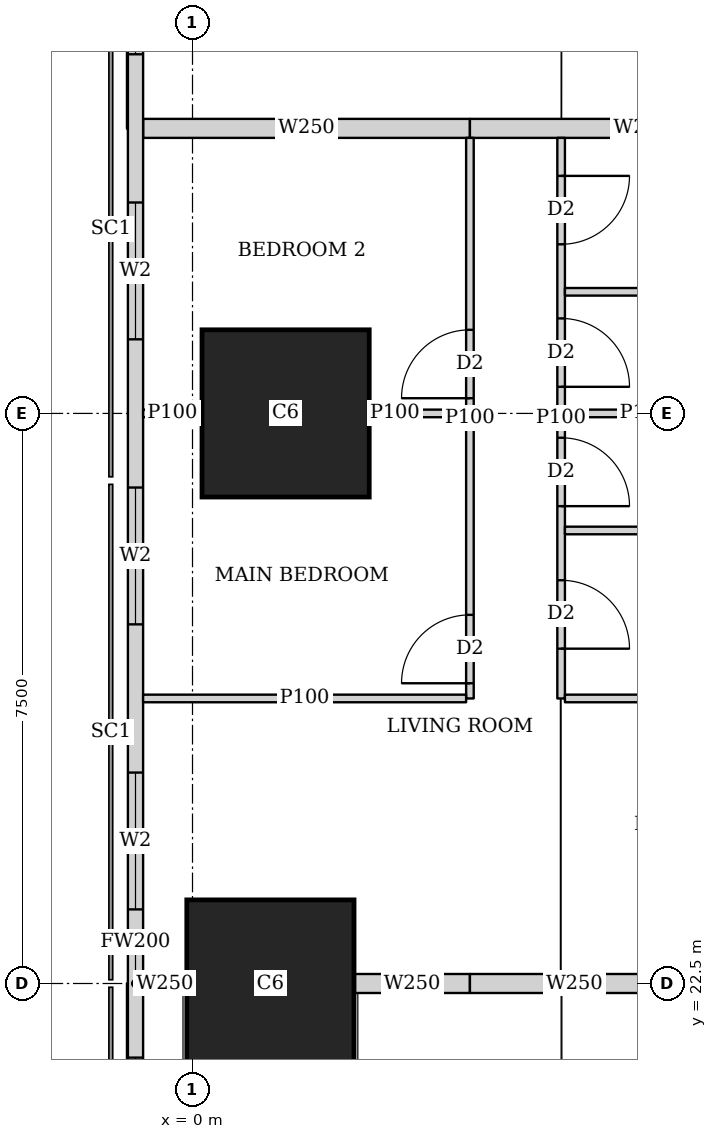
"""IFC4 building model, lengths in metres.
Left out: names, types, materials, properties, quantities, classifications, styles, units other than length and angle.
Written with IfcOpenShell. Run it as: python <this file> out.ifc"""

import sys

from ifc_helpers import new_model, si_unit, direction, frame, frame_2d, origin, origin_2d, place, context, subcontext, project, spatial, rectangle, extrude, element, fill, save


model = new_model("IFC4")
c1 = context("Model", 3, precision=1e-05, world=origin(), true_north=direction((0.0, 1.0)))
c2 = subcontext(c1, "Body", "Model", "MODEL_VIEW")
j1 = project(units=[si_unit("LENGTHUNIT", "METRE"), si_unit("PLANEANGLEUNIT", "RADIAN")], contexts=[c1])
p1 = place(None, origin())
s1 = spatial("IfcSite", under=j1, at=p1, CompositionType="ELEMENT")
p2 = place(p1, origin())
s2 = spatial("IfcBuilding", under=s1, at=p2, CompositionType="ELEMENT")
p3 = place(p2, frame((0.0, 0.0, 77.9)))
s3 = spatial("IfcBuildingStorey", under=s2, at=p3, CompositionType="ELEMENT", Elevation=77.9)
for number, where, z_axis, x_axis in (
    (1, (1.025, 22.5, 0.0), (0.0, 0.0, 1.0), (1.0, 0.0, 0.0)),
    (2, (1.225, 30.0, 0.0), (0.0, 0.0, 1.0), (1.0, 0.0, 0.0)),
):
    element("IfcColumn", number, at=place(p3, frame(where, z_axis=z_axis, x_axis=x_axis)), inside=s3, PredefinedType="COLUMN", context=c2, shape_type="SweptSolid", body=[
        extrude(rectangle(XDim=2.2, YDim=2.2, at=origin_2d()), origin(), (0.0, 0.0, 1.0), 3.75),
    ])
p4 = place(p3, frame((-0.75, 42.837, 0.0), z_axis=(0.0, 0.0, 1.0), x_axis=(0.0, -1.0, 0.0)))
e3 = element("IfcWall", 3, at=p4, inside=s3, PredefinedType="SOLIDWALL", context=c2, shape_type="SweptSolid", body=[
    extrude(rectangle(XDim=40.674, YDim=0.2, at=frame_2d((20.337, 0.0))), origin(), (0.0, 0.0, 1.0), 3.5),
])
p5 = place(p4, frame((1.78, 0.0, 0.9)))
e4 = element("IfcOpeningElement", 4, at=p5, cuts=e3, PredefinedType="OPENING", context=c2, shape_type="SweptSolid", body=[
    extrude(rectangle(XDim=1.8, YDim=1.5, at=frame_2d((0.9, 0.75))), frame((0.0, 0.11, 0.0), z_axis=(0.0, -1.0, 0.0), x_axis=(1.0, 0.0, 0.0)), (0.0, 0.0, 1.0), 0.22),
])
p6 = place(p4, frame((6.312, 0.0, 0.9)))
e5 = element("IfcOpeningElement", 5, at=p6, cuts=e3, PredefinedType="OPENING", context=c2, shape_type="SweptSolid", body=[
    extrude(rectangle(XDim=1.8, YDim=1.5, at=frame_2d((0.9, 0.75))), frame((0.0, 0.11, 0.0), z_axis=(0.0, -1.0, 0.0), x_axis=(1.0, 0.0, 0.0)), (0.0, 0.0, 1.0), 0.22),
])
p7 = place(p4, frame((10.062, 0.0, 0.9)))
e6 = element("IfcOpeningElement", 6, at=p7, cuts=e3, PredefinedType="OPENING", context=c2, shape_type="SweptSolid", body=[
    extrude(rectangle(XDim=1.8, YDim=1.5, at=frame_2d((0.9, 0.75))), frame((0.0, 0.11, 0.0), z_axis=(0.0, -1.0, 0.0), x_axis=(1.0, 0.0, 0.0)), (0.0, 0.0, 1.0), 0.22),
])
p8 = place(p4, frame((13.812, 0.0, 0.9)))
e7 = element("IfcOpeningElement", 7, at=p8, cuts=e3, PredefinedType="OPENING", context=c2, shape_type="SweptSolid", body=[
    extrude(rectangle(XDim=1.8, YDim=1.5, at=frame_2d((0.9, 0.75))), frame((0.0, 0.11, 0.0), z_axis=(0.0, -1.0, 0.0), x_axis=(1.0, 0.0, 0.0)), (0.0, 0.0, 1.0), 0.22),
])
p9 = place(p4, frame((17.562, 0.0, 0.9)))
e8 = element("IfcOpeningElement", 8, at=p9, cuts=e3, PredefinedType="OPENING", context=c2, shape_type="SweptSolid", body=[
    extrude(rectangle(XDim=1.8, YDim=1.5, at=frame_2d((0.9, 0.75))), frame((0.0, 0.11, 0.0), z_axis=(0.0, -1.0, 0.0), x_axis=(1.0, 0.0, 0.0)), (0.0, 0.0, 1.0), 0.22),
])
p10 = place(p4, frame((21.312, 0.0, 0.9)))
e9 = element("IfcOpeningElement", 9, at=p10, cuts=e3, PredefinedType="OPENING", context=c2, shape_type="SweptSolid", body=[
    extrude(rectangle(XDim=1.8, YDim=1.5, at=frame_2d((0.9, 0.75))), frame((0.0, 0.11, 0.0), z_axis=(0.0, -1.0, 0.0), x_axis=(1.0, 0.0, 0.0)), (0.0, 0.0, 1.0), 0.22),
])
p11 = place(p4, frame((25.062, 0.0, 0.9)))
e10 = element("IfcOpeningElement", 10, at=p11, cuts=e3, PredefinedType="OPENING", context=c2, shape_type="SweptSolid", body=[
    extrude(rectangle(XDim=1.8, YDim=1.5, at=frame_2d((0.9, 0.75))), frame((0.0, 0.11, 0.0), z_axis=(0.0, -1.0, 0.0), x_axis=(1.0, 0.0, 0.0)), (0.0, 0.0, 1.0), 0.22),
])
p12 = place(p4, frame((28.812, 0.0, 0.9)))
e11 = element("IfcOpeningElement", 11, at=p12, cuts=e3, PredefinedType="OPENING", context=c2, shape_type="SweptSolid", body=[
    extrude(rectangle(XDim=1.8, YDim=1.5, at=frame_2d((0.9, 0.75))), frame((0.0, 0.11, 0.0), z_axis=(0.0, -1.0, 0.0), x_axis=(1.0, 0.0, 0.0)), (0.0, 0.0, 1.0), 0.22),
])
p13 = place(p4, frame((32.562, 0.0, 0.9)))
e12 = element("IfcOpeningElement", 12, at=p13, cuts=e3, PredefinedType="OPENING", context=c2, shape_type="SweptSolid", body=[
    extrude(rectangle(XDim=1.8, YDim=1.5, at=frame_2d((0.9, 0.75))), frame((0.0, 0.11, 0.0), z_axis=(0.0, -1.0, 0.0), x_axis=(1.0, 0.0, 0.0)), (0.0, 0.0, 1.0), 0.22),
])
p14 = place(p4, frame((37.094, 0.0, 0.9)))
e13 = element("IfcOpeningElement", 13, at=p14, cuts=e3, PredefinedType="OPENING", context=c2, shape_type="SweptSolid", body=[
    extrude(rectangle(XDim=1.8, YDim=1.5, at=frame_2d((0.9, 0.75))), frame((0.0, 0.11, 0.0), z_axis=(0.0, -1.0, 0.0), x_axis=(1.0, 0.0, 0.0)), (0.0, 0.0, 1.0), 0.22),
])
p15 = place(p3, frame((3.65, 26.25, 0.0), z_axis=(0.0, 0.0, 1.0), x_axis=(0.0, 1.0, 0.0)))
e14 = element("IfcWall", 14, at=p15, inside=s3, PredefinedType="PARTITIONING", context=c2, shape_type="SweptSolid", body=[
    extrude(rectangle(XDim=7.375, YDim=0.1, at=frame_2d((3.688, 0.0))), origin(), (0.0, 0.0, 1.0), 3.5),
])
p16 = place(p15, frame((0.2, 0.0, 0.0)))
e15 = element("IfcOpeningElement", 15, at=p16, cuts=e14, PredefinedType="OPENING", context=c2, shape_type="SweptSolid", body=[
    extrude(rectangle(XDim=0.9, YDim=2.1, at=frame_2d((0.45, 1.05))), frame((0.0, 0.06, 0.0), z_axis=(0.0, -1.0, 0.0), x_axis=(1.0, 0.0, 0.0)), (0.0, 0.0, 1.0), 0.12),
])
p17 = place(p15, frame((3.95, 0.0, 0.0)))
e16 = element("IfcOpeningElement", 16, at=p17, cuts=e14, PredefinedType="OPENING", context=c2, shape_type="SweptSolid", body=[
    extrude(rectangle(XDim=0.9, YDim=2.1, at=frame_2d((0.45, 1.05))), frame((0.0, 0.06, 0.0), z_axis=(0.0, -1.0, 0.0), x_axis=(1.0, 0.0, 0.0)), (0.0, 0.0, 1.0), 0.12),
])
p18 = place(p3, frame((4.85, 26.25, 0.0), z_axis=(0.0, 0.0, 1.0), x_axis=(0.0, 1.0, 0.0)))
e17 = element("IfcWall", 17, at=p18, inside=s3, PredefinedType="PARTITIONING", context=c2, shape_type="SweptSolid", body=[
    extrude(rectangle(XDim=7.375, YDim=0.1, at=frame_2d((3.688, 0.0))), origin(), (0.0, 0.0, 1.0), 3.5),
])
p19 = place(p18, frame((0.655, 0.0, 0.0)))
e18 = element("IfcOpeningElement", 18, at=p19, cuts=e17, PredefinedType="OPENING", context=c2, shape_type="SweptSolid", body=[
    extrude(rectangle(XDim=0.9, YDim=2.1, at=frame_2d((0.45, 1.05))), frame((0.0, 0.06, 0.0), z_axis=(0.0, -1.0, 0.0), x_axis=(1.0, 0.0, 0.0)), (0.0, 0.0, 1.0), 0.12),
])
p20 = place(p18, frame((4.1, 0.0, 0.0)))
e19 = element("IfcOpeningElement", 19, at=p20, cuts=e17, PredefinedType="OPENING", context=c2, shape_type="SweptSolid", body=[
    extrude(rectangle(XDim=0.9, YDim=2.1, at=frame_2d((0.45, 1.05))), frame((0.0, 0.06, 0.0), z_axis=(0.0, -1.0, 0.0), x_axis=(1.0, 0.0, 0.0)), (0.0, 0.0, 1.0), 0.12),
])
p21 = place(p18, frame((2.53, 0.0, 0.0)))
e20 = element("IfcOpeningElement", 20, at=p21, cuts=e17, PredefinedType="OPENING", context=c2, shape_type="SweptSolid", body=[
    extrude(rectangle(XDim=0.9, YDim=2.1, at=frame_2d((0.45, 1.05))), frame((0.0, 0.06, 0.0), z_axis=(0.0, -1.0, 0.0), x_axis=(1.0, 0.0, 0.0)), (0.0, 0.0, 1.0), 0.12),
])
p22 = place(p18, frame((5.975, 0.0, 0.0)))
e21 = element("IfcOpeningElement", 21, at=p22, cuts=e17, PredefinedType="OPENING", context=c2, shape_type="SweptSolid", body=[
    extrude(rectangle(XDim=0.9, YDim=2.1, at=frame_2d((0.45, 1.05))), frame((0.0, 0.06, 0.0), z_axis=(0.0, -1.0, 0.0), x_axis=(1.0, 0.0, 0.0)), (0.0, 0.0, 1.0), 0.12),
])
p23 = place(p3, frame((-0.65, 26.25, 0.0), z_axis=(0.0, 0.0, 1.0), x_axis=(1.0, 0.0, 0.0)))
e22 = element("IfcWall", 22, at=p23, inside=s3, PredefinedType="PARTITIONING", context=c2, shape_type="SweptSolid", body=[
    extrude(rectangle(XDim=4.25, YDim=0.1, at=frame_2d((2.125, 0.0))), origin(), (0.0, 0.0, 1.0), 2.2),
])
p24 = place(p3, frame((-0.65, 30.0, 0.0), z_axis=(0.0, 0.0, 1.0), x_axis=(1.0, 0.0, 0.0)))
e23 = element("IfcWall", 23, at=p24, inside=s3, PredefinedType="PARTITIONING", context=c2, shape_type="SweptSolid", body=[
    extrude(rectangle(XDim=0.774, YDim=0.1, at=frame_2d((0.387, 0.0))), origin(), (0.0, 0.0, 1.0), 3.5),
])
p25 = place(p3, frame((2.326, 30.0, 0.0), z_axis=(0.0, 0.0, 1.0), x_axis=(1.0, 0.0, 0.0)))
e24 = element("IfcWall", 24, at=p25, inside=s3, PredefinedType="PARTITIONING", context=c2, shape_type="SweptSolid", body=[
    extrude(rectangle(XDim=1.274, YDim=0.1, at=frame_2d((0.637, 0.0))), origin(), (0.0, 0.0, 1.0), 3.5),
])
p26 = place(p3, frame((4.9, 26.25, 0.0), z_axis=(0.0, 0.0, 1.0), x_axis=(1.0, 0.0, 0.0)))
e25 = element("IfcWall", 25, at=p26, inside=s3, PredefinedType="PARTITIONING", context=c2, shape_type="SweptSolid", body=[
    extrude(rectangle(XDim=3.275, YDim=0.1, at=frame_2d((1.638, 0.0))), origin(), (0.0, 0.0, 1.0), 3.5),
])
p27 = place(p3, frame((4.9, 30.0, 0.0), z_axis=(0.0, 0.0, 1.0), x_axis=(1.0, 0.0, 0.0)))
e26 = element("IfcWall", 26, at=p27, inside=s3, PredefinedType="PARTITIONING", context=c2, shape_type="SweptSolid", body=[
    extrude(rectangle(XDim=1.499, YDim=0.1, at=frame_2d((0.75, 0.0))), origin(), (0.0, 0.0, 1.0), 3.5),
])
for number, where, z_axis, x_axis in (
    (27, (4.9, 28.46, 0.0), (0.0, 0.0, 1.0), (1.0, 0.0, 0.0)),
    (28, (4.9, 31.6, 0.0), (0.0, 0.0, 1.0), (1.0, 0.0, 0.0)),
):
    element("IfcWall", number, at=place(p3, frame(where, z_axis=z_axis, x_axis=x_axis)), inside=s3, PredefinedType="PARTITIONING", context=c2, shape_type="SweptSolid", body=[
        extrude(rectangle(XDim=3.275, YDim=0.1, at=frame_2d((1.638, 0.0))), origin(), (0.0, 0.0, 1.0), 3.5),
    ])
p28 = place(p3, frame((-0.65, 22.5, 0.0), z_axis=(0.0, 0.0, 1.0), x_axis=(1.0, 0.0, 0.0)))
e29 = element("IfcWall", 29, at=p28, inside=s3, PredefinedType="SOLIDWALL", context=c2, shape_type="SweptSolid", body=[
    extrude(rectangle(XDim=0.574, YDim=0.25, at=frame_2d((0.287, 0.0))), origin(), (0.0, 0.0, 1.0), 3.5),
])
p29 = place(p3, frame((2.126, 22.5, 0.0), z_axis=(0.0, 0.0, 1.0), x_axis=(1.0, 0.0, 0.0)))
e30 = element("IfcWall", 30, at=p29, inside=s3, PredefinedType="SOLIDWALL", context=c2, shape_type="SweptSolid", body=[
    extrude(rectangle(XDim=1.524, YDim=0.25, at=frame_2d((0.762, 0.0))), origin(), (0.0, 0.0, 1.0), 3.5),
])
p30 = place(p3, frame((3.65, 22.5, 0.0), z_axis=(0.0, 0.0, 1.0), x_axis=(1.0, 0.0, 0.0)))
e31 = element("IfcWall", 31, at=p30, inside=s3, PredefinedType="SOLIDWALL", context=c2, shape_type="SweptSolid", body=[
    extrude(rectangle(XDim=2.749, YDim=0.25, at=frame_2d((1.375, 0.0))), origin(), (0.0, 0.0, 1.0), 3.5),
])
p31 = place(p3, frame((-0.65, 33.75, 0.0), z_axis=(0.0, 0.0, 1.0), x_axis=(1.0, 0.0, 0.0)))
e32 = element("IfcWall", 32, at=p31, inside=s3, PredefinedType="SOLIDWALL", context=c2, shape_type="SweptSolid", body=[
    extrude(rectangle(XDim=4.3, YDim=0.25, at=frame_2d((2.15, 0.0))), origin(), (0.0, 0.0, 1.0), 2.2),
])
p32 = place(p3, frame((3.65, 33.75, 0.0), z_axis=(0.0, 0.0, 1.0), x_axis=(1.0, 0.0, 0.0)))
e33 = element("IfcWall", 33, at=p32, inside=s3, PredefinedType="SOLIDWALL", context=c2, shape_type="SweptSolid", body=[
    extrude(rectangle(XDim=4.525, YDim=0.25, at=frame_2d((2.263, 0.0))), origin(), (0.0, 0.0, 1.0), 3.5),
])
p33 = place(p6, origin())
e34 = element("IfcWindow", 34, at=p33, inside=s3, PartitioningType="SINGLE_PANEL", PredefinedType="WINDOW", context=c2, shape_type="SweptSolid", body=[
    extrude(rectangle(XDim=1.8, YDim=1.5, at=frame_2d((0.9, 0.75))), frame((0.0, 0.03, 0.0), z_axis=(0.0, -1.0, 0.0), x_axis=(1.0, 0.0, 0.0)), (0.0, 0.0, 1.0), 0.06),
])
fill(e5, e34)
p34 = place(p7, origin())
e35 = element("IfcWindow", 35, at=p34, inside=s3, PartitioningType="SINGLE_PANEL", PredefinedType="WINDOW", context=c2, shape_type="SweptSolid", body=[
    extrude(rectangle(XDim=1.8, YDim=1.5, at=frame_2d((0.9, 0.75))), frame((0.0, 0.03, 0.0), z_axis=(0.0, -1.0, 0.0), x_axis=(1.0, 0.0, 0.0)), (0.0, 0.0, 1.0), 0.06),
])
fill(e6, e35)
p35 = place(p8, origin())
e36 = element("IfcWindow", 36, at=p35, inside=s3, PartitioningType="SINGLE_PANEL", PredefinedType="WINDOW", context=c2, shape_type="SweptSolid", body=[
    extrude(rectangle(XDim=1.8, YDim=1.5, at=frame_2d((0.9, 0.75))), frame((0.0, 0.03, 0.0), z_axis=(0.0, -1.0, 0.0), x_axis=(1.0, 0.0, 0.0)), (0.0, 0.0, 1.0), 0.06),
])
fill(e7, e36)
p36 = place(p9, origin())
e37 = element("IfcWindow", 37, at=p36, inside=s3, PartitioningType="SINGLE_PANEL", PredefinedType="WINDOW", context=c2, shape_type="SweptSolid", body=[
    extrude(rectangle(XDim=1.8, YDim=1.5, at=frame_2d((0.9, 0.75))), frame((0.0, 0.03, 0.0), z_axis=(0.0, -1.0, 0.0), x_axis=(1.0, 0.0, 0.0)), (0.0, 0.0, 1.0), 0.06),
])
fill(e8, e37)
p37 = place(p10, origin())
e38 = element("IfcWindow", 38, at=p37, inside=s3, PartitioningType="SINGLE_PANEL", PredefinedType="WINDOW", context=c2, shape_type="SweptSolid", body=[
    extrude(rectangle(XDim=1.8, YDim=1.5, at=frame_2d((0.9, 0.75))), frame((0.0, 0.03, 0.0), z_axis=(0.0, -1.0, 0.0), x_axis=(1.0, 0.0, 0.0)), (0.0, 0.0, 1.0), 0.06),
])
fill(e9, e38)
p38 = place(p16, origin())
e39 = element("IfcDoor", 39, at=p38, inside=s3, OperationType="SINGLE_SWING_LEFT", PredefinedType="DOOR", context=c2, shape_type="SweptSolid", body=[
    extrude(rectangle(XDim=0.9, YDim=2.1, at=frame_2d((0.45, 1.05))), frame((0.0, 0.025, 0.0), z_axis=(0.0, -1.0, 0.0), x_axis=(1.0, 0.0, 0.0)), (0.0, 0.0, 1.0), 0.05),
])
fill(e15, e39)
p39 = place(p17, origin())
e40 = element("IfcDoor", 40, at=p39, inside=s3, OperationType="SINGLE_SWING_LEFT", PredefinedType="DOOR", context=c2, shape_type="SweptSolid", body=[
    extrude(rectangle(XDim=0.9, YDim=2.1, at=frame_2d((0.45, 1.05))), frame((0.0, 0.025, 0.0), z_axis=(0.0, -1.0, 0.0), x_axis=(1.0, 0.0, 0.0)), (0.0, 0.0, 1.0), 0.05),
])
fill(e16, e40)
p40 = place(p19, origin())
e41 = element("IfcDoor", 41, at=p40, inside=s3, OperationType="SINGLE_SWING_RIGHT", PredefinedType="DOOR", context=c2, shape_type="SweptSolid", body=[
    extrude(rectangle(XDim=0.9, YDim=2.1, at=frame_2d((0.45, 1.05))), frame((0.0, 0.025, 0.0), z_axis=(0.0, -1.0, 0.0), x_axis=(1.0, 0.0, 0.0)), (0.0, 0.0, 1.0), 0.05),
])
fill(e18, e41)
p41 = place(p20, origin())
e42 = element("IfcDoor", 42, at=p41, inside=s3, OperationType="SINGLE_SWING_RIGHT", PredefinedType="DOOR", context=c2, shape_type="SweptSolid", body=[
    extrude(rectangle(XDim=0.9, YDim=2.1, at=frame_2d((0.45, 1.05))), frame((0.0, 0.025, 0.0), z_axis=(0.0, -1.0, 0.0), x_axis=(1.0, 0.0, 0.0)), (0.0, 0.0, 1.0), 0.05),
])
fill(e19, e42)
p42 = place(p21, origin())
e43 = element("IfcDoor", 43, at=p42, inside=s3, OperationType="SINGLE_SWING_RIGHT", PredefinedType="DOOR", context=c2, shape_type="SweptSolid", body=[
    extrude(rectangle(XDim=0.9, YDim=2.1, at=frame_2d((0.45, 1.05))), frame((0.0, 0.025, 0.0), z_axis=(0.0, -1.0, 0.0), x_axis=(1.0, 0.0, 0.0)), (0.0, 0.0, 1.0), 0.05),
])
fill(e20, e43)
p43 = place(p22, origin())
e44 = element("IfcDoor", 44, at=p43, inside=s3, OperationType="SINGLE_SWING_LEFT", PredefinedType="DOOR", context=c2, shape_type="SweptSolid", body=[
    extrude(rectangle(XDim=0.9, YDim=2.1, at=frame_2d((0.45, 1.05))), frame((0.0, 0.025, 0.0), z_axis=(0.0, -1.0, 0.0), x_axis=(1.0, 0.0, 0.0)), (0.0, 0.0, 1.0), 0.05),
])
fill(e21, e44)
save(model, sys.argv[1])
